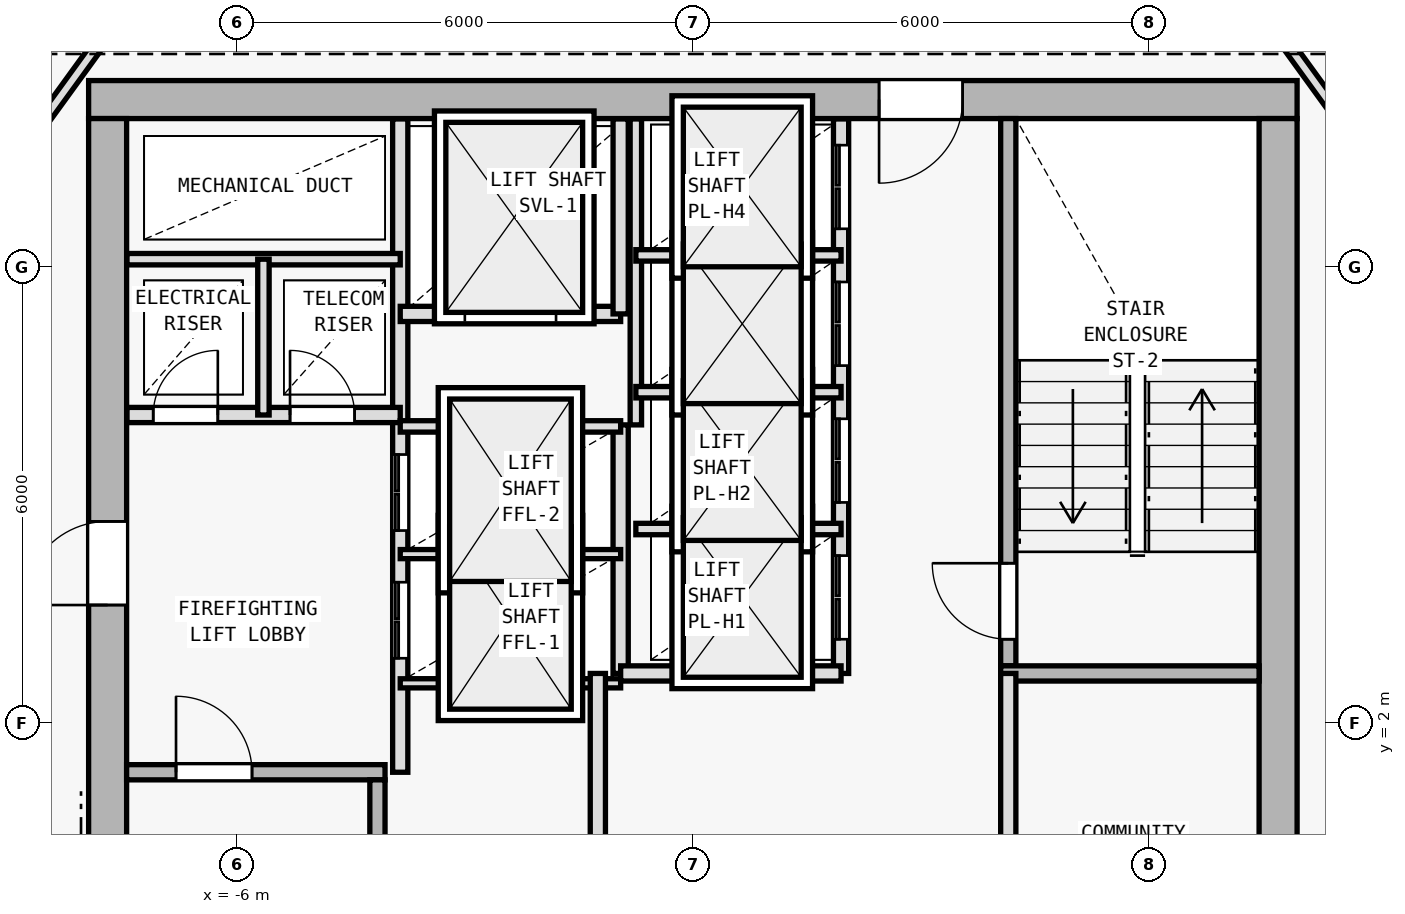
"""IFC4 building model, lengths in metres.
Left out: names, types, materials, properties, quantities, classifications, styles, units other than length and angle.
Written with IfcOpenShell. Run it as: python <this file> out.ifc"""

import sys

from ifc_helpers import new_model, si_unit, direction, frame, frame_2d, origin, origin_2d, place, context, subcontext, project, spatial, rectangle, i_section, extrude, element, fill, save


model = new_model("IFC4")
c1 = context("Model", 3, precision=1e-05, world=origin(), true_north=direction((0.0, 1.0)))
c2 = subcontext(c1, "Body", "Model", "MODEL_VIEW")
j1 = project(units=[si_unit("LENGTHUNIT", "METRE"), si_unit("PLANEANGLEUNIT", "RADIAN")], contexts=[c1])
p1 = place(None, origin())
s1 = spatial("IfcSite", under=j1, at=p1, CompositionType="ELEMENT")
p2 = place(p1, origin())
s2 = spatial("IfcBuilding", under=s1, at=p2, CompositionType="ELEMENT")
p3 = place(p2, frame((0.0, 0.0, 230.7)))
s3 = spatial("IfcBuildingStorey", under=s2, at=p3, CompositionType="ELEMENT", Elevation=230.7)
for number, where, z_axis, x_axis in (
    (1, (7.7, 10.2, 0.0), (0.0, 0.0, 1.0), (1.0, 0.0, 0.0)),
    (2, (-7.7, 10.2, 0.0), (0.0, 0.0, 1.0), (1.0, 0.0, 0.0)),
    (3, (7.7, 0.4, 0.0), (0.0, 0.0, 1.0), (1.0, 0.0, 0.0)),
    (4, (-7.7, 2.0, 0.0), (0.0, 0.0, 1.0), (1.0, 0.0, 0.0)),
):
    element("IfcColumn", number, at=place(p3, frame(where, z_axis=z_axis, x_axis=x_axis)), inside=s3, PredefinedType="COLUMN", context=c2, shape_type="SweptSolid", body=[
        extrude(i_section(OverallWidth=0.398, OverallDepth=0.387, WebThickness=0.013, FlangeThickness=0.022, FilletRadius=0.015, at=origin_2d()), origin(), (0.0, 0.0, 1.0), 3.6),
    ])
p4 = place(p3, frame((7.95, 10.2, 0.0), z_axis=(0.0, 0.0, 1.0), x_axis=(-1.0, 0.0, 0.0)))
e5 = element("IfcWall", 5, at=p4, inside=s3, PredefinedType="SHEAR", context=c2, shape_type="SweptSolid", body=[
    extrude(rectangle(XDim=15.9, YDim=0.5, at=frame_2d((7.95, 0.0))), origin(), (0.0, 0.0, 1.0), 3.35),
])
p5 = place(p4, frame((4.4, 0.0, 0.0)))
e6 = element("IfcOpeningElement", 6, at=p5, cuts=e5, PredefinedType="OPENING", context=c2, shape_type="SweptSolid", body=[
    extrude(rectangle(XDim=1.1, YDim=2.15, at=frame_2d((0.55, 1.075))), frame((0.0, 0.26, 0.0), z_axis=(0.0, -1.0, 0.0), x_axis=(1.0, 0.0, 0.0)), (0.0, 0.0, 1.0), 0.52),
])
p6 = place(p3, frame((-7.7, -9.15, 0.0), z_axis=(0.0, 0.0, 1.0), x_axis=(0.0, 1.0, 0.0)))
e7 = element("IfcWall", 7, at=p6, inside=s3, PredefinedType="SHEAR", context=c2, shape_type="SweptSolid", body=[
    extrude(rectangle(XDim=19.1, YDim=0.5, at=frame_2d((9.55, 0.0))), origin(), (0.0, 0.0, 1.0), 3.35),
])
p7 = place(p6, frame((12.7, 0.0, 0.0)))
e8 = element("IfcOpeningElement", 8, at=p7, cuts=e7, PredefinedType="OPENING", context=c2, shape_type="SweptSolid", body=[
    extrude(rectangle(XDim=1.1, YDim=2.15, at=frame_2d((0.55, 1.075))), frame((0.0, 0.26, 0.0), z_axis=(0.0, -1.0, 0.0), x_axis=(1.0, 0.0, 0.0)), (0.0, 0.0, 1.0), 0.52),
])
p8 = place(p3, frame((7.7, 9.95, 0.0), z_axis=(0.0, 0.0, 1.0), x_axis=(0.0, -1.0, 0.0)))
e9 = element("IfcWall", 9, at=p8, inside=s3, PredefinedType="SHEAR", context=c2, shape_type="SweptSolid", body=[
    extrude(rectangle(XDim=19.1, YDim=0.5, at=frame_2d((9.55, 0.0))), origin(), (0.0, 0.0, 1.0), 3.35),
])
p9 = place(p3, frame((-7.45, 1.35, 0.0), z_axis=(0.0, 0.0, 1.0), x_axis=(1.0, 0.0, 0.0)))
e10 = element("IfcWall", 10, at=p9, inside=s3, PredefinedType="SOLIDWALL", context=c2, shape_type="SweptSolid", body=[
    extrude(rectangle(XDim=3.4, YDim=0.2, at=frame_2d((1.7, 0.0))), origin(), (0.0, 0.0, 1.0), 3.35),
])
p10 = place(p9, frame((0.65, 0.0, 0.0)))
e11 = element("IfcOpeningElement", 11, at=p10, cuts=e10, PredefinedType="OPENING", context=c2, shape_type="SweptSolid", body=[
    extrude(rectangle(XDim=1.0, YDim=2.15, at=frame_2d((0.5, 1.075))), frame((0.0, 0.11, 0.0), z_axis=(0.0, -1.0, 0.0), x_axis=(1.0, 0.0, 0.0)), (0.0, 0.0, 1.0), 0.22),
])
p11 = place(p3, frame((-4.15, -5.95, 0.0), z_axis=(0.0, 0.0, 1.0), x_axis=(0.0, 1.0, 0.0)))
e12 = element("IfcWall", 12, at=p11, inside=s3, PredefinedType="SOLIDWALL", context=c2, shape_type="SweptSolid", body=[
    extrude(rectangle(XDim=7.2, YDim=0.2, at=frame_2d((3.6, 0.0))), origin(), (0.0, 0.0, 1.0), 3.35),
])
p12 = place(p3, frame((-3.85, 1.35, 0.0), z_axis=(0.0, 0.0, 1.0), x_axis=(0.0, 1.0, 0.0)))
e13 = element("IfcWall", 13, at=p12, inside=s3, PredefinedType="SOLIDWALL", context=c2, shape_type="SweptSolid", body=[
    extrude(rectangle(XDim=8.595, YDim=0.2, at=frame_2d((4.297, 0.0))), origin(), (0.0, 0.0, 1.0), 3.35),
])
p13 = place(p12, frame((1.5, 0.0, 0.0)))
e14 = element("IfcOpeningElement", 14, at=p13, cuts=e13, PredefinedType="OPENING", context=c2, shape_type="SweptSolid", body=[
    extrude(rectangle(XDim=1.0, YDim=2.15, at=frame_2d((0.5, 1.075))), frame((0.0, 0.11, 0.0), z_axis=(0.0, -1.0, 0.0), x_axis=(1.0, 0.0, 0.0)), (0.0, 0.0, 1.0), 0.22),
])
p14 = place(p12, frame((3.18, 0.0, 0.0)))
e15 = element("IfcOpeningElement", 15, at=p14, cuts=e13, PredefinedType="OPENING", context=c2, shape_type="SweptSolid", body=[
    extrude(rectangle(XDim=1.0, YDim=2.15, at=frame_2d((0.5, 1.075))), frame((0.0, 0.11, 0.0), z_axis=(0.0, -1.0, 0.0), x_axis=(1.0, 0.0, 0.0)), (0.0, 0.0, 1.0), 0.22),
])
p15 = place(p3, frame((-7.445, 6.05, 0.0), z_axis=(0.0, 0.0, 1.0), x_axis=(1.0, 0.0, 0.0)))
e16 = element("IfcWall", 16, at=p15, inside=s3, PredefinedType="SOLIDWALL", context=c2, shape_type="SweptSolid", body=[
    extrude(rectangle(XDim=3.595, YDim=0.2, at=frame_2d((1.797, 0.0))), origin(), (0.0, 0.0, 1.0), 3.35),
])
p16 = place(p15, frame((0.345, 0.0, 0.0)))
e17 = element("IfcOpeningElement", 17, at=p16, cuts=e16, PredefinedType="OPENING", context=c2, shape_type="SweptSolid", body=[
    extrude(rectangle(XDim=0.85, YDim=2.1, at=frame_2d((0.425, 1.05))), frame((0.0, 0.11, 0.0), z_axis=(0.0, -1.0, 0.0), x_axis=(1.0, 0.0, 0.0)), (0.0, 0.0, 1.0), 0.22),
])
p17 = place(p15, frame((2.145, 0.0, 0.0)))
e18 = element("IfcOpeningElement", 18, at=p17, cuts=e16, PredefinedType="OPENING", context=c2, shape_type="SweptSolid", body=[
    extrude(rectangle(XDim=0.85, YDim=2.1, at=frame_2d((0.425, 1.05))), frame((0.0, 0.11, 0.0), z_axis=(0.0, -1.0, 0.0), x_axis=(1.0, 0.0, 0.0)), (0.0, 0.0, 1.0), 0.22),
])
p18 = place(p3, frame((-7.445, 8.1, 0.0), z_axis=(0.0, 0.0, 1.0), x_axis=(1.0, 0.0, 0.0)))
e19 = element("IfcWall", 19, at=p18, inside=s3, PredefinedType="PARTITIONING", context=c2, shape_type="SweptSolid", body=[
    extrude(rectangle(XDim=3.595, YDim=0.15, at=frame_2d((1.797, 0.0))), origin(), (0.0, 0.0, 1.0), 3.35),
])
p19 = place(p3, frame((-5.65, 6.05, 0.0), z_axis=(0.0, 0.0, 1.0), x_axis=(0.0, 1.0, 0.0)))
e20 = element("IfcWall", 20, at=p19, inside=s3, PredefinedType="PARTITIONING", context=c2, shape_type="SweptSolid", body=[
    extrude(rectangle(XDim=2.05, YDim=0.15, at=frame_2d((1.025, 0.0))), origin(), (0.0, 0.0, 1.0), 3.35),
])
p20 = place(p3, frame((4.15, 2.75, 0.0), z_axis=(0.0, 0.0, 1.0), x_axis=(0.0, 1.0, 0.0)))
e21 = element("IfcWall", 21, at=p20, inside=s3, PredefinedType="SOLIDWALL", context=c2, shape_type="SweptSolid", body=[
    extrude(rectangle(XDim=7.2, YDim=0.2, at=frame_2d((3.6, 0.0))), origin(), (0.0, 0.0, 1.0), 3.35),
])
p21 = place(p20, frame((0.35, 0.0, 0.0)))
e22 = element("IfcOpeningElement", 22, at=p21, cuts=e21, PredefinedType="OPENING", context=c2, shape_type="SweptSolid", body=[
    extrude(rectangle(XDim=1.0, YDim=2.15, at=frame_2d((0.5, 1.075))), frame((0.0, 0.11, 0.0), z_axis=(0.0, -1.0, 0.0), x_axis=(1.0, 0.0, 0.0)), (0.0, 0.0, 1.0), 0.22),
])
p22 = place(p3, frame((4.05, 2.65, 0.0), z_axis=(0.0, 0.0, 1.0), x_axis=(1.0, 0.0, 0.0)))
e23 = element("IfcWall", 23, at=p22, inside=s3, PredefinedType="SOLIDWALL", context=c2, shape_type="SweptSolid", body=[
    extrude(rectangle(XDim=3.4, YDim=0.2, at=frame_2d((1.7, 0.0))), origin(), (0.0, 0.0, 1.0), 3.35),
])
p23 = place(p3, frame((-0.95, 2.65, 0.0), z_axis=(0.0, 0.0, 1.0), x_axis=(0.0, 1.0, 0.0)))
e24 = element("IfcWall", 24, at=p23, inside=s3, PredefinedType="SOLIDWALL", context=c2, shape_type="SweptSolid", body=[
    extrude(rectangle(XDim=3.27, YDim=0.2, at=frame_2d((1.635, 0.0))), origin(), (0.0, 0.0, 1.0), 3.35),
])
for number, where, z_axis, x_axis in (
    (25, (-3.85, 2.52, 0.0), (0.0, 0.0, 1.0), (1.0, 0.0, 0.0)),
    (26, (-3.85, 4.22, 0.0), (0.0, 0.0, 1.0), (1.0, 0.0, 0.0)),
):
    element("IfcWall", number, at=place(p3, frame(where, z_axis=z_axis, x_axis=x_axis)), inside=s3, PredefinedType="PARTITIONING", context=c2, shape_type="SweptSolid", body=[
        extrude(rectangle(XDim=2.9, YDim=0.12, at=frame_2d((1.45, 0.0))), origin(), (0.0, 0.0, 1.0), 3.35),
    ])
p24 = place(p3, frame((-3.85, 5.9, 0.0), z_axis=(0.0, 0.0, 1.0), x_axis=(1.0, 0.0, 0.0)))
e27 = element("IfcWall", 27, at=p24, inside=s3, PredefinedType="PARTITIONING", context=c2, shape_type="SweptSolid", body=[
    extrude(rectangle(XDim=2.9, YDim=0.15, at=frame_2d((1.45, 0.0))), origin(), (0.0, 0.0, 1.0), 3.35),
])
p25 = place(p3, frame((-3.85, 7.38, 0.0), z_axis=(0.0, 0.0, 1.0), x_axis=(1.0, 0.0, 0.0)))
e28 = element("IfcWall", 28, at=p25, inside=s3, PredefinedType="SOLIDWALL", context=c2, shape_type="SweptSolid", body=[
    extrude(rectangle(XDim=2.9, YDim=0.2, at=frame_2d((1.45, 0.0))), origin(), (0.0, 0.0, 1.0), 3.35),
])
p26 = place(p25, frame((0.85, 0.0, 0.0)))
e29 = element("IfcOpeningElement", 29, at=p26, cuts=e28, PredefinedType="OPENING", context=c2, shape_type="SweptSolid", body=[
    extrude(rectangle(XDim=1.2, YDim=2.2, at=frame_2d((0.6, 1.1))), frame((0.0, 0.11, 0.0), z_axis=(0.0, -1.0, 0.0), x_axis=(1.0, 0.0, 0.0)), (0.0, 0.0, 1.0), 0.22),
])
p27 = place(p3, frame((-0.95, 7.38, 0.0), z_axis=(0.0, 0.0, 1.0), x_axis=(0.0, 1.0, 0.0)))
e30 = element("IfcWall", 30, at=p27, inside=s3, PredefinedType="SOLIDWALL", context=c2, shape_type="SweptSolid", body=[
    extrude(rectangle(XDim=2.565, YDim=0.2, at=frame_2d((1.283, 0.0))), origin(), (0.0, 0.0, 1.0), 3.35),
])
p28 = place(p3, frame((4.15, -6.05, 0.0), z_axis=(0.0, 0.0, 1.0), x_axis=(0.0, 1.0, 0.0)))
e31 = element("IfcWall", 31, at=p28, inside=s3, PredefinedType="SOLIDWALL", context=c2, shape_type="SweptSolid", body=[
    extrude(rectangle(XDim=8.7, YDim=0.2, at=frame_2d((4.35, 0.0))), origin(), (0.0, 0.0, 1.0), 3.35),
])
p29 = place(p28, frame((3.6, 0.0, 0.0)))
e32 = element("IfcOpeningElement", 32, at=p29, cuts=e31, PredefinedType="OPENING", context=c2, shape_type="SweptSolid", body=[
    extrude(rectangle(XDim=0.95, YDim=2.1, at=frame_2d((0.475, 1.05))), frame((0.0, 0.11, 0.0), z_axis=(0.0, -1.0, 0.0), x_axis=(1.0, 0.0, 0.0)), (0.0, 0.0, 1.0), 0.22),
])
p30 = place(p3, frame((-1.25, -6.05, 0.0), z_axis=(0.0, 0.0, 1.0), x_axis=(0.0, 1.0, 0.0)))
e33 = element("IfcWall", 33, at=p30, inside=s3, PredefinedType="SOLIDWALL", context=c2, shape_type="SweptSolid", body=[
    extrude(rectangle(XDim=8.7, YDim=0.2, at=frame_2d((4.35, 0.0))), origin(), (0.0, 0.0, 1.0), 3.35),
])
p31 = place(p30, frame((3.4, 0.0, 0.0)))
e34 = element("IfcOpeningElement", 34, at=p31, cuts=e33, PredefinedType="OPENING", context=c2, shape_type="SweptSolid", body=[
    extrude(rectangle(XDim=0.95, YDim=2.1, at=frame_2d((0.475, 1.05))), frame((0.0, 0.11, 0.0), z_axis=(0.0, -1.0, 0.0), x_axis=(1.0, 0.0, 0.0)), (0.0, 0.0, 1.0), 0.22),
])
p32 = place(p3, frame((1.95, 2.65, 0.0), z_axis=(0.0, 0.0, 1.0), x_axis=(0.0, 1.0, 0.0)))
e35 = element("IfcWall", 35, at=p32, inside=s3, PredefinedType="SOLIDWALL", context=c2, shape_type="SweptSolid", body=[
    extrude(rectangle(XDim=7.295, YDim=0.2, at=frame_2d((3.647, 0.0))), origin(), (0.0, 0.0, 1.0), 3.35),
])
p33 = place(p32, frame((0.45, 0.0, 0.0)))
e36 = element("IfcOpeningElement", 36, at=p33, cuts=e35, PredefinedType="OPENING", context=c2, shape_type="SweptSolid", body=[
    extrude(rectangle(XDim=1.1, YDim=2.15, at=frame_2d((0.55, 1.075))), frame((0.0, 0.11, 0.0), z_axis=(0.0, -1.0, 0.0), x_axis=(1.0, 0.0, 0.0)), (0.0, 0.0, 1.0), 0.22),
])
p34 = place(p32, frame((2.25, 0.0, 0.0)))
e37 = element("IfcOpeningElement", 37, at=p34, cuts=e35, PredefinedType="OPENING", context=c2, shape_type="SweptSolid", body=[
    extrude(rectangle(XDim=1.1, YDim=2.15, at=frame_2d((0.55, 1.075))), frame((0.0, 0.11, 0.0), z_axis=(0.0, -1.0, 0.0), x_axis=(1.0, 0.0, 0.0)), (0.0, 0.0, 1.0), 0.22),
])
p35 = place(p32, frame((4.05, 0.0, 0.0)))
e38 = element("IfcOpeningElement", 38, at=p35, cuts=e35, PredefinedType="OPENING", context=c2, shape_type="SweptSolid", body=[
    extrude(rectangle(XDim=1.1, YDim=2.15, at=frame_2d((0.55, 1.075))), frame((0.0, 0.11, 0.0), z_axis=(0.0, -1.0, 0.0), x_axis=(1.0, 0.0, 0.0)), (0.0, 0.0, 1.0), 0.22),
])
p36 = place(p32, frame((5.85, 0.0, 0.0)))
e39 = element("IfcOpeningElement", 39, at=p36, cuts=e35, PredefinedType="OPENING", context=c2, shape_type="SweptSolid", body=[
    extrude(rectangle(XDim=1.1, YDim=2.15, at=frame_2d((0.55, 1.075))), frame((0.0, 0.11, 0.0), z_axis=(0.0, -1.0, 0.0), x_axis=(1.0, 0.0, 0.0)), (0.0, 0.0, 1.0), 0.22),
])
p37 = place(p3, frame((-0.95, 2.65, 0.0), z_axis=(0.0, 0.0, 1.0), x_axis=(1.0, 0.0, 0.0)))
e40 = element("IfcWall", 40, at=p37, inside=s3, PredefinedType="SOLIDWALL", context=c2, shape_type="SweptSolid", body=[
    extrude(rectangle(XDim=2.9, YDim=0.2, at=frame_2d((1.45, 0.0))), origin(), (0.0, 0.0, 1.0), 3.35),
])
p38 = place(p3, frame((-0.75, 5.92, 0.0), z_axis=(0.0, 0.0, 1.0), x_axis=(0.0, 1.0, 0.0)))
e41 = element("IfcWall", 41, at=p38, inside=s3, PredefinedType="PARTITIONING", context=c2, shape_type="SweptSolid", body=[
    extrude(rectangle(XDim=4.025, YDim=0.15, at=frame_2d((2.013, 0.0))), origin(), (0.0, 0.0, 1.0), 3.35),
])
for number, where, z_axis, x_axis in (
    (42, (-0.75, 4.55, 0.0), (0.0, 0.0, 1.0), (1.0, 0.0, 0.0)),
    (43, (-0.75, 6.35, 0.0), (0.0, 0.0, 1.0), (1.0, 0.0, 0.0)),
    (44, (-0.75, 8.15, 0.0), (0.0, 0.0, 1.0), (1.0, 0.0, 0.0)),
):
    element("IfcWall", number, at=place(p3, frame(where, z_axis=z_axis, x_axis=x_axis)), inside=s3, PredefinedType="PARTITIONING", context=c2, shape_type="SweptSolid", body=[
        extrude(rectangle(XDim=2.7, YDim=0.15, at=frame_2d((1.35, 0.0))), origin(), (0.0, 0.0, 1.0), 3.35),
    ])
p39 = place(p3, frame((-9.78, 8.226, 0.0), z_axis=(0.0, 0.0, 1.0), x_axis=(0.586956386413, 0.809618552436, 0.0)))
e45 = element("IfcWall", 45, at=p39, inside=s3, PredefinedType="PARTITIONING", context=c2, shape_type="SweptSolid", body=[
    extrude(rectangle(XDim=5.008, YDim=0.15, at=frame_2d((2.504, 0.0))), origin(), (0.0, 0.0, 1.0), 2.975),
])
p40 = place(p3, frame((6.841, 12.28, 0.0), z_axis=(0.0, 0.0, 1.0), x_axis=(0.586956386413, -0.809618552436, 0.0)))
e46 = element("IfcWall", 46, at=p40, inside=s3, PredefinedType="PARTITIONING", context=c2, shape_type="SweptSolid", body=[
    extrude(rectangle(XDim=5.008, YDim=0.15, at=frame_2d((2.504, 0.0))), origin(), (0.0, 0.0, 1.0), 2.965),
])
p41 = place(p7, origin())
e47 = element("IfcDoor", 47, at=p41, inside=s3, OperationType="SINGLE_SWING_LEFT", PredefinedType="DOOR", context=c2, shape_type="SweptSolid", body=[
    extrude(rectangle(XDim=1.1, YDim=2.15, at=frame_2d((0.55, 1.075))), frame((0.0, 0.025, 0.0), z_axis=(0.0, -1.0, 0.0), x_axis=(1.0, 0.0, 0.0)), (0.0, 0.0, 1.0), 0.05),
])
fill(e8, e47)
p42 = place(p5, origin())
e48 = element("IfcDoor", 48, at=p42, inside=s3, OperationType="SINGLE_SWING_RIGHT", PredefinedType="DOOR", context=c2, shape_type="SweptSolid", body=[
    extrude(rectangle(XDim=1.1, YDim=2.15, at=frame_2d((0.55, 1.075))), frame((0.0, 0.025, 0.0), z_axis=(0.0, -1.0, 0.0), x_axis=(1.0, 0.0, 0.0)), (0.0, 0.0, 1.0), 0.05),
])
fill(e6, e48)
p43 = place(p10, origin())
e49 = element("IfcDoor", 49, at=p43, inside=s3, OperationType="SINGLE_SWING_LEFT", PredefinedType="DOOR", context=c2, shape_type="SweptSolid", body=[
    extrude(rectangle(XDim=1.0, YDim=2.15, at=frame_2d((0.5, 1.075))), frame((0.0, 0.025, 0.0), z_axis=(0.0, -1.0, 0.0), x_axis=(1.0, 0.0, 0.0)), (0.0, 0.0, 1.0), 0.05),
])
fill(e11, e49)
p44 = place(p16, origin())
e50 = element("IfcDoor", 50, at=p44, inside=s3, OperationType="SINGLE_SWING_RIGHT", PredefinedType="DOOR", context=c2, shape_type="SweptSolid", body=[
    extrude(rectangle(XDim=0.85, YDim=2.1, at=frame_2d((0.425, 1.05))), frame((0.0, 0.025, 0.0), z_axis=(0.0, -1.0, 0.0), x_axis=(1.0, 0.0, 0.0)), (0.0, 0.0, 1.0), 0.05),
])
fill(e17, e50)
p45 = place(p17, origin())
e51 = element("IfcDoor", 51, at=p45, inside=s3, OperationType="SINGLE_SWING_LEFT", PredefinedType="DOOR", context=c2, shape_type="SweptSolid", body=[
    extrude(rectangle(XDim=0.85, YDim=2.1, at=frame_2d((0.425, 1.05))), frame((0.0, 0.025, 0.0), z_axis=(0.0, -1.0, 0.0), x_axis=(1.0, 0.0, 0.0)), (0.0, 0.0, 1.0), 0.05),
])
fill(e18, e51)
p46 = place(p21, origin())
e52 = element("IfcDoor", 52, at=p46, inside=s3, OperationType="SINGLE_SWING_RIGHT", PredefinedType="DOOR", context=c2, shape_type="SweptSolid", body=[
    extrude(rectangle(XDim=1.0, YDim=2.15, at=frame_2d((0.5, 1.075))), frame((0.0, 0.025, 0.0), z_axis=(0.0, -1.0, 0.0), x_axis=(1.0, 0.0, 0.0)), (0.0, 0.0, 1.0), 0.05),
])
fill(e22, e52)
p47 = place(p26, origin())
e53 = element("IfcDoor", 53, at=p47, inside=s3, OperationType="DOUBLE_DOOR_SLIDING", PredefinedType="DOOR", context=c2, shape_type="SweptSolid", body=[
    extrude(rectangle(XDim=1.2, YDim=2.2, at=frame_2d((0.6, 1.1))), frame((0.0, 0.025, 0.0), z_axis=(0.0, -1.0, 0.0), x_axis=(1.0, 0.0, 0.0)), (0.0, 0.0, 1.0), 0.05),
])
fill(e29, e53)
p48 = place(p33, origin())
e54 = element("IfcDoor", 54, at=p48, inside=s3, OperationType="DOUBLE_DOOR_SLIDING", PredefinedType="DOOR", context=c2, shape_type="SweptSolid", body=[
    extrude(rectangle(XDim=1.1, YDim=2.15, at=frame_2d((0.55, 1.075))), frame((0.0, 0.025, 0.0), z_axis=(0.0, -1.0, 0.0), x_axis=(1.0, 0.0, 0.0)), (0.0, 0.0, 1.0), 0.05),
])
fill(e36, e54)
p49 = place(p34, origin())
e55 = element("IfcDoor", 55, at=p49, inside=s3, OperationType="DOUBLE_DOOR_SLIDING", PredefinedType="DOOR", context=c2, shape_type="SweptSolid", body=[
    extrude(rectangle(XDim=1.1, YDim=2.15, at=frame_2d((0.55, 1.075))), frame((0.0, 0.025, 0.0), z_axis=(0.0, -1.0, 0.0), x_axis=(1.0, 0.0, 0.0)), (0.0, 0.0, 1.0), 0.05),
])
fill(e37, e55)
p50 = place(p35, origin())
e56 = element("IfcDoor", 56, at=p50, inside=s3, OperationType="DOUBLE_DOOR_SLIDING", PredefinedType="DOOR", context=c2, shape_type="SweptSolid", body=[
    extrude(rectangle(XDim=1.1, YDim=2.15, at=frame_2d((0.55, 1.075))), frame((0.0, 0.025, 0.0), z_axis=(0.0, -1.0, 0.0), x_axis=(1.0, 0.0, 0.0)), (0.0, 0.0, 1.0), 0.05),
])
fill(e38, e56)
p51 = place(p36, origin())
e57 = element("IfcDoor", 57, at=p51, inside=s3, OperationType="DOUBLE_DOOR_SLIDING", PredefinedType="DOOR", context=c2, shape_type="SweptSolid", body=[
    extrude(rectangle(XDim=1.1, YDim=2.15, at=frame_2d((0.55, 1.075))), frame((0.0, 0.025, 0.0), z_axis=(0.0, -1.0, 0.0), x_axis=(1.0, 0.0, 0.0)), (0.0, 0.0, 1.0), 0.05),
])
fill(e39, e57)
p52 = place(p13, origin())
e58 = element("IfcDoor", 58, at=p52, inside=s3, OperationType="DOUBLE_DOOR_SLIDING", PredefinedType="DOOR", context=c2, shape_type="SweptSolid", body=[
    extrude(rectangle(XDim=1.0, YDim=2.15, at=frame_2d((0.5, 1.075))), frame((0.0, 0.025, 0.0), z_axis=(0.0, -1.0, 0.0), x_axis=(1.0, 0.0, 0.0)), (0.0, 0.0, 1.0), 0.05),
])
fill(e14, e58)
p53 = place(p14, origin())
e59 = element("IfcDoor", 59, at=p53, inside=s3, OperationType="DOUBLE_DOOR_SLIDING", PredefinedType="DOOR", context=c2, shape_type="SweptSolid", body=[
    extrude(rectangle(XDim=1.0, YDim=2.15, at=frame_2d((0.5, 1.075))), frame((0.0, 0.025, 0.0), z_axis=(0.0, -1.0, 0.0), x_axis=(1.0, 0.0, 0.0)), (0.0, 0.0, 1.0), 0.05),
])
fill(e15, e59)
save(model, sys.argv[1])
